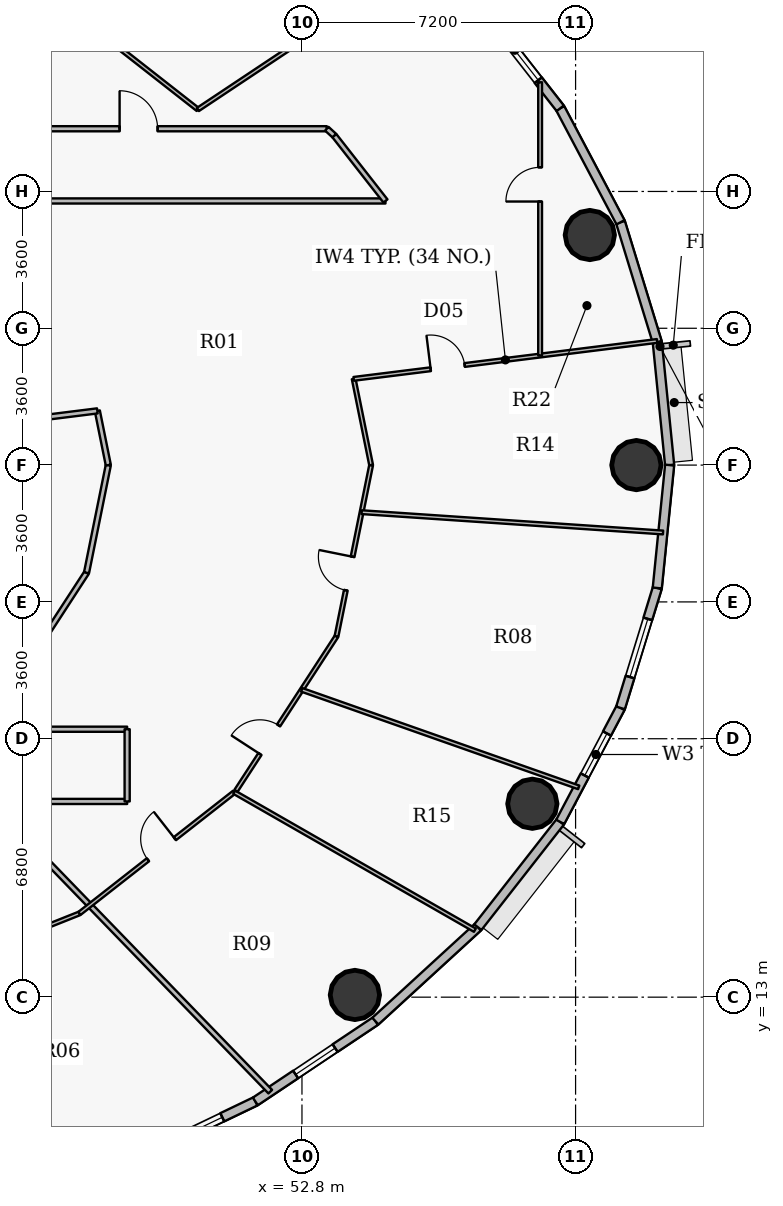
"""IFC4 building model, lengths in metres.
Left out: names, types, materials, properties, quantities, classifications, styles, units other than length and angle.
Written with IfcOpenShell. Run it as: python <this file> out.ifc"""

import sys

from ifc_helpers import new_model, si_unit, direction, frame, frame_2d, origin, origin_2d, place, context, subcontext, project, spatial, rectangle, hollow_circle, extrude, source, transform, mapped, element, fill, save


model = new_model("IFC4")
c1 = context("Model", 3, precision=1e-05, world=origin(), true_north=direction((0.0, 1.0)))
c2 = subcontext(c1, "Body", "Model", "MODEL_VIEW")
j1 = project(units=[si_unit("LENGTHUNIT", "METRE"), si_unit("PLANEANGLEUNIT", "RADIAN")], contexts=[c1])
p1 = place(None, origin())
s1 = spatial("IfcSite", under=j1, at=p1, CompositionType="ELEMENT")
p2 = place(p1, origin())
s2 = spatial("IfcBuilding", under=s1, at=p2, CompositionType="ELEMENT")
p3 = place(p2, frame((0.0, 0.0, 197.4)))
s3 = spatial("IfcBuildingStorey", under=s2, at=p3, CompositionType="ELEMENT", Elevation=197.4)
for number, where, z_axis, x_axis in (
    (1, (61.6, 27.0, 0.0), (0.0, 0.0, 1.0), (1.0, 0.0, 0.0)),
    (2, (60.375, 33.053, 0.0), (0.0, 0.0, 1.0), (1.0, 0.0, 0.0)),
    (3, (54.192, 13.058, 0.0), (0.0, 0.0, 1.0), (1.0, 0.0, 0.0)),
    (4, (58.863, 18.089, 0.0), (0.0, 0.0, 1.0), (1.0, 0.0, 0.0)),
):
    element("IfcColumn", number, at=place(p3, frame(where, z_axis=z_axis, x_axis=x_axis)), inside=s3, PredefinedType="COLUMN", context=c2, shape_type="SweptSolid", body=[
        extrude(hollow_circle(Radius=0.65, WallThickness=0.04, at=origin_2d()), origin(), (0.0, 0.0, 1.0), 3.75),
    ])
p4 = place(p3, frame((62.15, 30.234, 0.0), z_axis=(0.0, 0.0, 1.0), x_axis=(0.100061534614, -0.994981250723, 0.0)))
e5 = element("IfcWall", 5, at=p4, inside=s3, PredefinedType="SOLIDWALL", context=c2, shape_type="SweptSolid", body=[
    extrude(rectangle(XDim=3.25, YDim=0.24, at=frame_2d((1.625, 0.0))), origin(), (0.0, 0.0, 1.0), 3.5),
])
p5 = place(p3, frame((61.183, 33.389, 0.0), z_axis=(0.0, 0.0, 1.0), x_axis=(0.293097995113, -0.956082405058, 0.0)))
e6 = element("IfcWall", 6, at=p5, inside=s3, PredefinedType="SOLIDWALL", context=c2, shape_type="SweptSolid", body=[
    extrude(rectangle(XDim=3.3, YDim=0.24, at=frame_2d((1.65, 0.0))), origin(), (0.0, 0.0, 1.0), 3.5),
])
p6 = place(p3, frame((59.596, 36.388, 0.0), z_axis=(0.0, 0.0, 1.0), x_axis=(0.467586874938, -0.88394712194, 0.0)))
e7 = element("IfcWall", 7, at=p6, inside=s3, PredefinedType="SOLIDWALL", context=c2, shape_type="SweptSolid", body=[
    extrude(rectangle(XDim=3.393, YDim=0.24, at=frame_2d((1.697, 0.0))), origin(), (0.0, 0.0, 1.0), 3.5),
])
p7 = place(p3, frame((57.428, 39.158, 0.0), z_axis=(0.0, 0.0, 1.0), x_axis=(0.616287674549, -0.787521112224, 0.0)))
e8 = element("IfcWall", 8, at=p7, inside=s3, PredefinedType="SOLIDWALL", context=c2, shape_type="SweptSolid", body=[
    extrude(rectangle(XDim=3.517, YDim=0.24, at=frame_2d((1.759, 0.0))), origin(), (0.0, 0.0, 1.0), 3.5),
])
p8 = place(p7, frame((0.579, 0.0, 0.9)))
e9 = element("IfcOpeningElement", 9, at=p8, cuts=e8, PredefinedType="OPENING", context=c2, shape_type="SweptSolid", body=[
    extrude(rectangle(XDim=2.0, YDim=1.75, at=origin_2d()), frame((1.0, 0.13, 0.875), z_axis=(0.0, -1.0, 0.0), x_axis=(1.0, 0.0, 0.0)), (0.0, 0.0, 1.0), 0.26),
])
p9 = place(p3, frame((51.573, 10.257, 0.0), z_axis=(0.0, 0.0, 1.0), x_axis=(-0.901564733809, -0.432644231155, 0.0)))
e10 = element("IfcWall", 10, at=p9, inside=s3, PredefinedType="SOLIDWALL", context=c2, shape_type="SweptSolid", body=[
    extrude(rectangle(XDim=3.93, YDim=0.24, at=frame_2d((1.965, 0.0))), origin(), (0.0, 0.0, 1.0), 3.5),
])
p10 = place(p9, frame((0.965, 0.0, 0.9)))
e11 = element("IfcOpeningElement", 11, at=p10, cuts=e10, PredefinedType="OPENING", context=c2, shape_type="SweptSolid", body=[
    extrude(rectangle(XDim=2.0, YDim=1.75, at=origin_2d()), frame((1.0, 0.13, 0.875), z_axis=(0.0, -1.0, 0.0), x_axis=(1.0, 0.0, 0.0)), (0.0, 0.0, 1.0), 0.26),
])
p11 = place(p3, frame((54.732, 12.369, 0.0), z_axis=(0.0, 0.0, 1.0), x_axis=(-0.831228998277, -0.555930168657, 0.0)))
e12 = element("IfcWall", 12, at=p11, inside=s3, PredefinedType="SOLIDWALL", context=c2, shape_type="SweptSolid", body=[
    extrude(rectangle(XDim=3.8, YDim=0.24, at=frame_2d((1.9, 0.0))), origin(), (0.0, 0.0, 1.0), 3.5),
])
p12 = place(p11, frame((1.275, 0.0, 0.9)))
e13 = element("IfcOpeningElement", 13, at=p12, cuts=e12, PredefinedType="OPENING", context=c2, shape_type="SweptSolid", body=[
    extrude(rectangle(XDim=1.25, YDim=1.65, at=origin_2d()), frame((0.625, 0.13, 0.825), z_axis=(0.0, -1.0, 0.0), x_axis=(1.0, 0.0, 0.0)), (0.0, 0.0, 1.0), 0.26),
])
p13 = place(p3, frame((57.428, 14.842, 0.0), z_axis=(0.0, 0.0, 1.0), x_axis=(-0.737076565834, -0.675809245349, 0.0)))
e14 = element("IfcWall", 14, at=p13, inside=s3, PredefinedType="SOLIDWALL", context=c2, shape_type="SweptSolid", body=[
    extrude(rectangle(XDim=3.658, YDim=0.24, at=frame_2d((1.829, 0.0))), origin(), (0.0, 0.0, 1.0), 3.5),
])
p14 = place(p3, frame((59.596, 17.612, 0.0), z_axis=(0.0, 0.0, 1.0), x_axis=(-0.616287674549, -0.787521112224, 0.0)))
e15 = element("IfcWall", 15, at=p14, inside=s3, PredefinedType="SOLIDWALL", context=c2, shape_type="SweptSolid", body=[
    extrude(rectangle(XDim=3.517, YDim=0.24, at=frame_2d((1.759, 0.0))), origin(), (0.0, 0.0, 1.0), 3.5),
])
p15 = place(p3, frame((61.183, 20.611, 0.0), z_axis=(0.0, 0.0, 1.0), x_axis=(-0.467586874938, -0.88394712194, 0.0)))
e16 = element("IfcWall", 16, at=p15, inside=s3, PredefinedType="SOLIDWALL", context=c2, shape_type="SweptSolid", body=[
    extrude(rectangle(XDim=3.393, YDim=0.24, at=frame_2d((1.697, 0.0))), origin(), (0.0, 0.0, 1.0), 3.5),
])
p16 = place(p15, frame((0.762, 0.0, 0.9)))
e17 = element("IfcOpeningElement", 17, at=p16, cuts=e16, PredefinedType="OPENING", context=c2, shape_type="SweptSolid", body=[
    extrude(rectangle(XDim=1.25, YDim=1.65, at=origin_2d()), frame((0.625, 0.13, 0.825), z_axis=(0.0, -1.0, 0.0), x_axis=(1.0, 0.0, 0.0)), (0.0, 0.0, 1.0), 0.26),
])
p17 = place(p3, frame((62.15, 23.766, 0.0), z_axis=(0.0, 0.0, 1.0), x_axis=(-0.293097995113, -0.956082405058, 0.0)))
e18 = element("IfcWall", 18, at=p17, inside=s3, PredefinedType="SOLIDWALL", context=c2, shape_type="SweptSolid", body=[
    extrude(rectangle(XDim=3.3, YDim=0.24, at=frame_2d((1.65, 0.0))), origin(), (0.0, 0.0, 1.0), 3.5),
])
p18 = place(p17, frame((0.85, 0.0, 0.9)))
e19 = element("IfcOpeningElement", 19, at=p18, cuts=e18, PredefinedType="OPENING", context=c2, shape_type="SweptSolid", body=[
    extrude(rectangle(XDim=1.6, YDim=1.75, at=origin_2d()), frame((0.8, 0.13, 0.875), z_axis=(0.0, -1.0, 0.0), x_axis=(1.0, 0.0, 0.0)), (0.0, 0.0, 1.0), 0.26),
])
p19 = place(p3, frame((62.475, 27.0, 0.0), z_axis=(0.0, 0.0, 1.0), x_axis=(-0.100061534614, -0.994981250723, 0.0)))
e20 = element("IfcWall", 20, at=p19, inside=s3, PredefinedType="SOLIDWALL", context=c2, shape_type="SweptSolid", body=[
    extrude(rectangle(XDim=3.25, YDim=0.24, at=frame_2d((1.625, 0.0))), origin(), (0.0, 0.0, 1.0), 3.5),
])
p20 = place(p3, frame((34.605, 18.15, 0.0), z_axis=(0.0, 0.0, 1.0), x_axis=(1.0, 0.0, 0.0)))
e21 = element("IfcWall", 21, at=p20, inside=s3, PredefinedType="PARTITIONING", context=c2, shape_type="SweptSolid", body=[
    extrude(rectangle(XDim=13.595, YDim=0.135, at=frame_2d((6.798, 0.0))), origin(), (0.0, 0.0, 1.0), 2.935),
])
p21 = place(p3, frame((38.541, 35.85, 0.0), z_axis=(0.0, 0.0, 1.0), x_axis=(1.0, 0.0, 0.0)))
e22 = element("IfcWall", 22, at=p21, inside=s3, PredefinedType="PARTITIONING", context=c2, shape_type="SweptSolid", body=[
    extrude(rectangle(XDim=14.913, YDim=0.135, at=frame_2d((7.456, 0.0))), origin(), (0.0, 0.0, 1.0), 2.935),
])
p22 = place(p21, frame((9.46, 0.0, 0.0)))
e23 = element("IfcOpeningElement", 23, at=p22, cuts=e22, PredefinedType="OPENING", context=c2, shape_type="SweptSolid", body=[
    extrude(rectangle(XDim=1.0, YDim=2.15, at=origin_2d()), frame((0.5, 0.078, 1.075), z_axis=(0.0, -1.0, 0.0), x_axis=(1.0, 0.0, 0.0)), (0.0, 0.0, 1.0), 0.155),
])
p23 = place(p3, frame((41.076, 35.85, 0.0), z_axis=(0.0, 0.0, 1.0), x_axis=(0.497557605347, 0.867430936364, 0.0)))
e24 = element("IfcWall", 24, at=p23, inside=s3, PredefinedType="PARTITIONING", context=c2, shape_type="SweptSolid", body=[
    extrude(rectangle(XDim=11.522, YDim=0.135, at=frame_2d((5.761, 0.0))), origin(), (0.0, 0.0, 1.0), 2.935),
])
p24 = place(p3, frame((41.754, 13.133, 0.0), z_axis=(0.0, 0.0, 1.0), x_axis=(0.928798710424, 0.370584613166, 0.0)))
e25 = element("IfcWall", 25, at=p24, inside=s3, PredefinedType="PARTITIONING", context=c2, shape_type="SweptSolid", body=[
    extrude(rectangle(XDim=5.589, YDim=0.1, at=frame_2d((2.794, 0.0))), origin(), (0.0, 0.0, 1.0), 2.935),
])
p25 = place(p3, frame((44.571, 18.15, 0.0), z_axis=(0.0, 0.0, 1.0), x_axis=(0.695670435579, -0.718361082647, 0.0)))
e26 = element("IfcWall", 26, at=p25, inside=s3, PredefinedType="PARTITIONING", context=c2, shape_type="SweptSolid", body=[
    extrude(rectangle(XDim=10.63, YDim=0.135, at=frame_2d((5.315, 0.0))), origin(), (0.0, 0.0, 1.0), 2.935),
])
p26 = place(p3, frame((45.8, 20.05, 0.0), z_axis=(0.0, 0.0, 1.0), x_axis=(1.0, 0.0, 0.0)))
e27 = element("IfcWall", 27, at=p26, inside=s3, PredefinedType="PARTITIONING", context=c2, shape_type="SweptSolid", body=[
    extrude(rectangle(XDim=2.4, YDim=0.135, at=frame_2d((1.2, 0.0))), origin(), (0.0, 0.0, 1.0), 3.5),
])
p27 = place(p3, frame((45.8, 33.95, 0.0), z_axis=(0.0, 0.0, 1.0), x_axis=(1.0, 0.0, 0.0)))
e28 = element("IfcWall", 28, at=p27, inside=s3, PredefinedType="PARTITIONING", context=c2, shape_type="SweptSolid", body=[
    extrude(rectangle(XDim=9.197, YDim=0.135, at=frame_2d((4.599, 0.0))), origin(), (0.0, 0.0, 1.0), 3.5),
])
p28 = place(p3, frame((46.945, 15.204, 0.0), z_axis=(0.0, 0.0, 1.0), x_axis=(0.787319701233, 0.616544960282, 0.0)))
e29 = element("IfcWall", 29, at=p28, inside=s3, PredefinedType="PARTITIONING", context=c2, shape_type="SweptSolid", body=[
    extrude(rectangle(XDim=5.172, YDim=0.1, at=frame_2d((2.586, 0.0))), origin(), (0.0, 0.0, 1.0), 2.935),
])
p29 = place(p28, frame((2.289, 0.0, 0.0)))
e30 = element("IfcOpeningElement", 30, at=p29, cuts=e29, PredefinedType="OPENING", context=c2, shape_type="SweptSolid", body=[
    extrude(rectangle(XDim=0.9, YDim=2.1, at=origin_2d()), frame((0.45, 0.06, 1.05), z_axis=(0.0, -1.0, 0.0), x_axis=(1.0, 0.0, 0.0)), (0.0, 0.0, 1.0), 0.12),
])
p30 = place(p3, frame((46.945, 38.796, 0.0), z_axis=(0.0, 0.0, 1.0), x_axis=(0.787314896848, -0.616551095369, 0.0)))
e31 = element("IfcWall", 31, at=p30, inside=s3, PredefinedType="PARTITIONING", context=c2, shape_type="SweptSolid", body=[
    extrude(rectangle(XDim=3.958, YDim=0.1, at=frame_2d((1.979, 0.0))), origin(), (0.0, 0.0, 1.0), 2.935),
])
p31 = place(p3, frame((48.2, 18.15, 0.0), z_axis=(0.0, 0.0, 1.0), x_axis=(0.0, 1.0, 0.0)))
e32 = element("IfcWall", 32, at=p31, inside=s3, PredefinedType="PARTITIONING", context=c2, shape_type="SweptSolid", body=[
    extrude(rectangle(XDim=1.9, YDim=0.135, at=frame_2d((0.95, 0.0))), origin(), (0.0, 0.0, 1.0), 3.5),
])
p32 = place(p3, frame((50.06, 36.356, 0.0), z_axis=(0.0, 0.0, 1.0), x_axis=(0.832520763353, 0.553993843455, 0.0)))
e33 = element("IfcWall", 33, at=p32, inside=s3, PredefinedType="PARTITIONING", context=c2, shape_type="SweptSolid", body=[
    extrude(rectangle(XDim=7.26, YDim=0.1, at=frame_2d((3.63, 0.0))), origin(), (0.0, 0.0, 1.0), 2.935),
])
p33 = place(p32, frame((3.18, 0.0, 0.0)))
e34 = element("IfcOpeningElement", 34, at=p33, cuts=e33, PredefinedType="OPENING", context=c2, shape_type="SweptSolid", body=[
    extrude(rectangle(XDim=0.9, YDim=2.1, at=origin_2d()), frame((0.45, 0.06, 1.05), z_axis=(0.0, -1.0, 0.0), x_axis=(1.0, 0.0, 0.0)), (0.0, 0.0, 1.0), 0.12),
])
p34 = place(p3, frame((51.017, 18.393, 0.0), z_axis=(0.0, 0.0, 1.0), x_axis=(0.867591997953, -0.497276708773, 0.0)))
e35 = element("IfcWall", 35, at=p34, inside=s3, PredefinedType="PARTITIONING", context=c2, shape_type="SweptSolid", body=[
    extrude(rectangle(XDim=7.3, YDim=0.1, at=frame_2d((3.65, 0.0))), origin(), (0.0, 0.0, 1.0), 2.935),
])
p35 = place(p3, frame((51.064, 18.429, 0.0), z_axis=(0.0, 0.0, 1.0), x_axis=(0.545382906853, 0.838187022634, 0.0)))
e36 = element("IfcWall", 36, at=p35, inside=s3, PredefinedType="PARTITIONING", context=c2, shape_type="SweptSolid", body=[
    extrude(rectangle(XDim=4.849, YDim=0.1, at=frame_2d((2.425, 0.0))), origin(), (0.0, 0.0, 1.0), 2.935),
])
p36 = place(p35, frame((1.155, 0.0, 0.0)))
e37 = element("IfcOpeningElement", 37, at=p36, cuts=e36, PredefinedType="OPENING", context=c2, shape_type="SweptSolid", body=[
    extrude(rectangle(XDim=0.9, YDim=2.1, at=origin_2d()), frame((0.45, 0.06, 1.05), z_axis=(0.0, -1.0, 0.0), x_axis=(1.0, 0.0, 0.0)), (0.0, 0.0, 1.0), 0.12),
])
p37 = place(p3, frame((52.793, 21.087, 0.0), z_axis=(0.0, 0.0, 1.0), x_axis=(0.94322572083, -0.33215243423, 0.0)))
e38 = element("IfcWall", 38, at=p37, inside=s3, PredefinedType="PARTITIONING", context=c2, shape_type="SweptSolid", body=[
    extrude(rectangle(XDim=7.728, YDim=0.1, at=frame_2d((3.864, 0.0))), origin(), (0.0, 0.0, 1.0), 2.935),
])
p38 = place(p3, frame((53.454, 35.85, 0.0), z_axis=(0.0, 0.0, 1.0), x_axis=(0.736667385572, -0.676255249913, 0.0)))
e39 = element("IfcWall", 39, at=p38, inside=s3, PredefinedType="PARTITIONING", context=c2, shape_type="SweptSolid", body=[
    extrude(rectangle(XDim=0.271, YDim=0.135, at=frame_2d((0.135, 0.0))), origin(), (0.0, 0.0, 1.0), 3.5),
])
p39 = place(p3, frame((53.653, 35.667, 0.0), z_axis=(0.0, 0.0, 1.0), x_axis=(0.616302223209, -0.787509726713, 0.0)))
e40 = element("IfcWall", 40, at=p39, inside=s3, PredefinedType="PARTITIONING", context=c2, shape_type="SweptSolid", body=[
    extrude(rectangle(XDim=2.18, YDim=0.135, at=frame_2d((1.09, 0.0))), origin(), (0.0, 0.0, 1.0), 3.5),
])
p40 = place(p3, frame((53.709, 22.494, 0.0), z_axis=(0.0, 0.0, 1.0), x_axis=(0.19825018224, 0.980151450155, 0.0)))
e41 = element("IfcWall", 41, at=p40, inside=s3, PredefinedType="PARTITIONING", context=c2, shape_type="SweptSolid", body=[
    extrude(rectangle(XDim=4.597, YDim=0.1, at=frame_2d((2.299, 0.0))), origin(), (0.0, 0.0, 1.0), 2.935),
])
p41 = place(p40, frame((1.237, 0.0, 0.0)))
e42 = element("IfcOpeningElement", 42, at=p41, cuts=e41, PredefinedType="OPENING", context=c2, shape_type="SweptSolid", body=[
    extrude(rectangle(XDim=0.9, YDim=2.1, at=origin_2d()), frame((0.45, 0.06, 1.05), z_axis=(0.0, -1.0, 0.0), x_axis=(1.0, 0.0, 0.0)), (0.0, 0.0, 1.0), 0.12),
])
p42 = place(p3, frame((54.161, 29.269, 0.0), z_axis=(0.0, 0.0, 1.0), x_axis=(0.198265432228, -0.980148365495, 0.0)))
e43 = element("IfcWall", 43, at=p42, inside=s3, PredefinedType="PARTITIONING", context=c2, shape_type="SweptSolid", body=[
    extrude(rectangle(XDim=2.315, YDim=0.1, at=frame_2d((1.157, 0.0))), origin(), (0.0, 0.0, 1.0), 2.935),
])
p43 = place(p3, frame((54.161, 29.269, 0.0), z_axis=(0.0, 0.0, 1.0), x_axis=(0.99228860955, 0.123948841697, 0.0)))
e44 = element("IfcWall", 44, at=p43, inside=s3, PredefinedType="PARTITIONING", context=c2, shape_type="SweptSolid", body=[
    extrude(rectangle(XDim=8.046, YDim=0.1, at=frame_2d((4.023, 0.0))), origin(), (0.0, 0.0, 1.0), 2.935),
])
p44 = place(p43, frame((2.042, 0.0, 0.0)))
e45 = element("IfcOpeningElement", 45, at=p44, cuts=e44, PredefinedType="OPENING", context=c2, shape_type="SweptSolid", body=[
    extrude(rectangle(XDim=0.9, YDim=2.1, at=origin_2d()), frame((0.45, 0.06, 1.05), z_axis=(0.0, -1.0, 0.0), x_axis=(1.0, 0.0, 0.0)), (0.0, 0.0, 1.0), 0.12),
])
p45 = place(p3, frame((54.369, 25.761, 0.0), z_axis=(0.0, 0.0, 1.0), x_axis=(0.99773610993, -0.06725068729, 0.0)))
e46 = element("IfcWall", 46, at=p45, inside=s3, PredefinedType="PARTITIONING", context=c2, shape_type="SweptSolid", body=[
    extrude(rectangle(XDim=7.95, YDim=0.1, at=frame_2d((3.975, 0.0))), origin(), (0.0, 0.0, 1.0), 2.935),
])
p46 = place(p3, frame((59.067, 29.882, 0.0), z_axis=(0.0, 0.0, 1.0), x_axis=(0.0, 1.0, 0.0)))
e47 = element("IfcWall", 47, at=p46, inside=s3, PredefinedType="PARTITIONING", context=c2, shape_type="SweptSolid", body=[
    extrude(rectangle(XDim=7.191, YDim=0.1, at=frame_2d((3.596, 0.0))), origin(), (0.0, 0.0, 1.0), 2.935),
])
p47 = place(p46, frame((4.053, 0.0, 0.0)))
e48 = element("IfcOpeningElement", 48, at=p47, cuts=e47, PredefinedType="OPENING", context=c2, shape_type="SweptSolid", body=[
    extrude(rectangle(XDim=0.9, YDim=2.1, at=origin_2d()), frame((0.45, 0.06, 1.05), z_axis=(0.0, -1.0, 0.0), x_axis=(1.0, 0.0, 0.0)), (0.0, 0.0, 1.0), 0.12),
])
p48 = place(p3, frame((46.06, 22.521, 0.0), z_axis=(0.0, 0.0, 1.0), x_axis=(0.545342221334, 0.838213494064, 0.0)))
e49 = element("IfcWall", 49, at=p48, inside=s3, PredefinedType="PARTITIONING", context=c2, shape_type="SweptSolid", body=[
    extrude(rectangle(XDim=1.964, YDim=0.135, at=frame_2d((0.982, 0.0))), origin(), (0.0, 0.0, 1.0), 2.935),
])
p49 = place(p3, frame((47.131, 24.168, 0.0), z_axis=(0.0, 0.0, 1.0), x_axis=(0.198292837027, 0.980142821625, 0.0)))
e50 = element("IfcWall", 50, at=p49, inside=s3, PredefinedType="PARTITIONING", context=c2, shape_type="SweptSolid", body=[
    extrude(rectangle(XDim=2.89, YDim=0.135, at=frame_2d((1.445, 0.0))), origin(), (0.0, 0.0, 1.0), 2.935),
])
p50 = place(p3, frame((47.704, 27.0, 0.0), z_axis=(0.0, 0.0, 1.0), x_axis=(-0.198309620267, 0.980139426056, 0.0)))
e51 = element("IfcWall", 51, at=p50, inside=s3, PredefinedType="PARTITIONING", context=c2, shape_type="SweptSolid", body=[
    extrude(rectangle(XDim=1.455, YDim=0.135, at=frame_2d((0.728, 0.0))), origin(), (0.0, 0.0, 1.0), 2.935),
])
p51 = place(p3, frame((47.416, 28.426, 0.0), z_axis=(0.0, 0.0, 1.0), x_axis=(-0.992277876714, -0.124034734589, 0.0)))
e52 = element("IfcWall", 52, at=p51, inside=s3, PredefinedType="PARTITIONING", context=c2, shape_type="SweptSolid", body=[
    extrude(rectangle(XDim=1.366, YDim=0.135, at=frame_2d((0.683, 0.0))), origin(), (0.0, 0.0, 1.0), 3.5),
])
m1 = source(origin(), c2, "Body", "SweptSolid", [
    extrude(rectangle(XDim=2.0, YDim=1.75, at=origin_2d()), frame((1.0, 0.03, 0.875), z_axis=(0.0, -1.0, 0.0), x_axis=(1.0, 0.0, 0.0)), (0.0, 0.0, 1.0), 0.06),
])
p52 = place(p8, origin())
e53 = element("IfcWindow", 53, at=p52, inside=s3, PartitioningType="DOUBLE_PANEL_VERTICAL", PredefinedType="WINDOW", context=c2, shape_type="MappedRepresentation", body=[
    mapped(m1, transform((0.0, 0.0, 0.0), x_axis=(1.0, 0.0, 0.0), y_axis=(0.0, 1.0, 0.0), z_axis=(0.0, 0.0, 1.0), scale=1.0)),
])
fill(e9, e53)
p53 = place(p10, origin())
e54 = element("IfcWindow", 54, at=p53, inside=s3, PartitioningType="DOUBLE_PANEL_VERTICAL", PredefinedType="WINDOW", context=c2, shape_type="MappedRepresentation", body=[
    mapped(m1, transform((0.0, 0.0, 0.0), x_axis=(1.0, 0.0, 0.0), y_axis=(0.0, 1.0, 0.0), z_axis=(0.0, 0.0, 1.0), scale=1.0)),
])
fill(e11, e54)
m2 = source(origin(), c2, "Body", "SweptSolid", [
    extrude(rectangle(XDim=1.25, YDim=1.65, at=origin_2d()), frame((0.625, 0.03, 0.825), z_axis=(0.0, -1.0, 0.0), x_axis=(1.0, 0.0, 0.0)), (0.0, 0.0, 1.0), 0.06),
])
p54 = place(p16, origin())
e55 = element("IfcWindow", 55, at=p54, inside=s3, PartitioningType="SINGLE_PANEL", PredefinedType="WINDOW", context=c2, shape_type="MappedRepresentation", body=[
    mapped(m2, transform((0.0, 0.0, 0.0), x_axis=(1.0, 0.0, 0.0), y_axis=(0.0, 1.0, 0.0), z_axis=(0.0, 0.0, 1.0), scale=1.0)),
])
fill(e17, e55)
m3 = source(origin(), c2, "Body", "SweptSolid", [
    extrude(rectangle(XDim=1.6, YDim=1.75, at=origin_2d()), frame((0.8, 0.03, 0.875), z_axis=(0.0, -1.0, 0.0), x_axis=(1.0, 0.0, 0.0)), (0.0, 0.0, 1.0), 0.06),
])
p55 = place(p18, origin())
e56 = element("IfcWindow", 56, at=p55, inside=s3, PartitioningType="DOUBLE_PANEL_VERTICAL", PredefinedType="WINDOW", context=c2, shape_type="MappedRepresentation", body=[
    mapped(m3, transform((0.0, 0.0, 0.0), x_axis=(1.0, 0.0, 0.0), y_axis=(0.0, 1.0, 0.0), z_axis=(0.0, 0.0, 1.0), scale=1.0)),
])
fill(e19, e56)
p56 = place(p12, origin())
e57 = element("IfcWindow", 57, at=p56, inside=s3, PartitioningType="SINGLE_PANEL", PredefinedType="WINDOW", context=c2, shape_type="MappedRepresentation", body=[
    mapped(m2, transform((0.0, 0.0, 0.0), x_axis=(1.0, 0.0, 0.0), y_axis=(0.0, 1.0, 0.0), z_axis=(0.0, 0.0, 1.0), scale=1.0)),
])
fill(e13, e57)
m4 = source(origin(), c2, "Body", "SweptSolid", [
    extrude(rectangle(XDim=1.0, YDim=2.15, at=origin_2d()), frame((0.5, 0.025, 1.075), z_axis=(0.0, -1.0, 0.0), x_axis=(1.0, 0.0, 0.0)), (0.0, 0.0, 1.0), 0.05),
])
p57 = place(p22, origin())
e58 = element("IfcDoor", 58, at=p57, inside=s3, OperationType="SINGLE_SWING_LEFT", PredefinedType="DOOR", context=c2, shape_type="MappedRepresentation", body=[
    mapped(m4, transform((0.0, 0.0, 0.0), x_axis=(1.0, 0.0, 0.0), y_axis=(0.0, 1.0, 0.0), z_axis=(0.0, 0.0, 1.0), scale=1.0)),
])
fill(e23, e58)
m5 = source(origin(), c2, "Body", "SweptSolid", [
    extrude(rectangle(XDim=0.9, YDim=2.1, at=origin_2d()), frame((0.45, 0.025, 1.05), z_axis=(0.0, -1.0, 0.0), x_axis=(1.0, 0.0, 0.0)), (0.0, 0.0, 1.0), 0.05),
])
p58 = place(p29, origin())
e59 = element("IfcDoor", 59, at=p58, inside=s3, OperationType="SINGLE_SWING_RIGHT", PredefinedType="DOOR", context=c2, shape_type="MappedRepresentation", body=[
    mapped(m5, transform((0.0, 0.0, 0.0), x_axis=(1.0, 0.0, 0.0), y_axis=(0.0, 1.0, 0.0), z_axis=(0.0, 0.0, 1.0), scale=1.0)),
])
fill(e30, e59)
p59 = place(p36, origin())
e60 = element("IfcDoor", 60, at=p59, inside=s3, OperationType="SINGLE_SWING_LEFT", PredefinedType="DOOR", context=c2, shape_type="MappedRepresentation", body=[
    mapped(m5, transform((0.0, 0.0, 0.0), x_axis=(1.0, 0.0, 0.0), y_axis=(0.0, 1.0, 0.0), z_axis=(0.0, 0.0, 1.0), scale=1.0)),
])
fill(e37, e60)
p60 = place(p41, origin())
e61 = element("IfcDoor", 61, at=p60, inside=s3, OperationType="SINGLE_SWING_RIGHT", PredefinedType="DOOR", context=c2, shape_type="MappedRepresentation", body=[
    mapped(m5, transform((0.0, 0.0, 0.0), x_axis=(1.0, 0.0, 0.0), y_axis=(0.0, 1.0, 0.0), z_axis=(0.0, 0.0, 1.0), scale=1.0)),
])
fill(e42, e61)
p61 = place(p44, origin())
e62 = element("IfcDoor", 62, at=p61, inside=s3, OperationType="SINGLE_SWING_LEFT", PredefinedType="DOOR", context=c2, shape_type="MappedRepresentation", body=[
    mapped(m5, transform((0.0, 0.0, 0.0), x_axis=(1.0, 0.0, 0.0), y_axis=(0.0, 1.0, 0.0), z_axis=(0.0, 0.0, 1.0), scale=1.0)),
])
fill(e45, e62)
p62 = place(p47, origin())
e63 = element("IfcDoor", 63, at=p62, inside=s3, OperationType="SINGLE_SWING_LEFT", PredefinedType="DOOR", context=c2, shape_type="MappedRepresentation", body=[
    mapped(m5, transform((0.0, 0.0, 0.0), x_axis=(1.0, 0.0, 0.0), y_axis=(0.0, 1.0, 0.0), z_axis=(0.0, 0.0, 1.0), scale=1.0)),
])
fill(e48, e63)
save(model, sys.argv[1])
